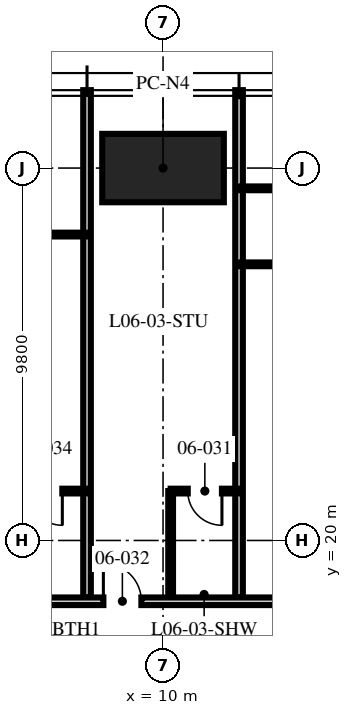
"""IFC4 building model, lengths in metres.
Left out: names, types, materials, properties, quantities, classifications, styles, units other than length and angle.
Written with IfcOpenShell. Run it as: python <this file> out.ifc"""

import sys

from ifc_helpers import new_model, si_unit, direction, frame, frame_2d, origin, origin_2d, place, context, subcontext, project, spatial, rectangle, hollow_rectangle, extrude, element, fill, save


model = new_model("IFC4")
c1 = context("Model", 3, precision=1e-05, world=origin(), true_north=direction((0.0, 1.0)))
c2 = subcontext(c1, "Body", "Model", "MODEL_VIEW")
j1 = project(units=[si_unit("LENGTHUNIT", "METRE"), si_unit("PLANEANGLEUNIT", "RADIAN")], contexts=[c1])
p1 = place(None, origin())
s1 = spatial("IfcSite", under=j1, at=p1, CompositionType="ELEMENT")
p2 = place(p1, origin())
s2 = spatial("IfcBuilding", under=s1, at=p2, CompositionType="ELEMENT")
p3 = place(p2, frame((0.0, 0.0, 28.5)))
s3 = spatial("IfcBuildingStorey", under=s2, at=p3, CompositionType="ELEMENT", Elevation=28.5)
p4 = place(p3, frame((10.0, 29.8, 0.0), z_axis=(0.0, 0.0, 1.0), x_axis=(1.0, 0.0, 0.0)))
e1 = element("IfcColumn", 1, at=p4, inside=s3, PredefinedType="COLUMN", context=c2, shape_type="SweptSolid", body=[
    extrude(hollow_rectangle(XDim=3.2, YDim=1.8, WallThickness=0.2, at=origin_2d()), origin(), (0.0, 0.0, 1.0), 3.75),
])
for number, where, z_axis, x_axis in (
    (2, (12.0, 18.5, 0.0), (0.0, 0.0, 1.0), (0.0, 1.0, 0.0)),
    (3, (8.0, 18.5, 0.0), (0.0, 0.0, 1.0), (0.0, 1.0, 0.0)),
):
    element("IfcWall", number, at=place(p3, frame(where, z_axis=z_axis, x_axis=x_axis)), inside=s3, PredefinedType="PARTITIONING", context=c2, shape_type="SweptSolid", body=[
        extrude(rectangle(XDim=13.35, YDim=0.2, at=frame_2d((6.675, 0.0))), origin(), (0.0, 0.0, 1.0), 2.71),
    ])
p5 = place(p3, frame((18.0, 29.267, 0.0), z_axis=(0.0, 0.0, 1.0), x_axis=(-1.0, 0.0, 0.0)))
e4 = element("IfcWall", 4, at=p5, inside=s3, PredefinedType="PARTITIONING", context=c2, shape_type="SweptSolid", body=[
    extrude(rectangle(XDim=6.0, YDim=0.1, at=frame_2d((3.0, 0.0))), origin(), (0.0, 0.0, 1.0), 2.61),
])
p6 = place(p5, frame((0.15, 0.0, 0.0)))
e5 = element("IfcOpeningElement", 5, at=p6, cuts=e4, PredefinedType="OPENING", context=c2, shape_type="SweptSolid", body=[
    extrude(rectangle(XDim=0.9, YDim=2.1, at=frame_2d((0.45, 1.05))), frame((0.0, 0.06, 0.0), z_axis=(0.0, -1.0, 0.0), x_axis=(1.0, 0.0, 0.0)), (0.0, 0.0, 1.0), 0.12),
])
p7 = place(p5, frame((3.15, 0.0, 0.0)))
e6 = element("IfcOpeningElement", 6, at=p7, cuts=e4, PredefinedType="OPENING", context=c2, shape_type="SweptSolid", body=[
    extrude(rectangle(XDim=0.9, YDim=2.1, at=frame_2d((0.45, 1.05))), frame((0.0, 0.06, 0.0), z_axis=(0.0, -1.0, 0.0), x_axis=(1.0, 0.0, 0.0)), (0.0, 0.0, 1.0), 0.12),
])
p8 = place(p3, frame((16.8, 27.267, 0.0), z_axis=(0.0, 0.0, 1.0), x_axis=(-1.0, 0.0, 0.0)))
e7 = element("IfcWall", 7, at=p8, inside=s3, PredefinedType="PARTITIONING", context=c2, shape_type="SweptSolid", body=[
    extrude(rectangle(XDim=4.8, YDim=0.1, at=frame_2d((2.4, 0.0))), origin(), (0.0, 0.0, 1.0), 2.61),
])
p9 = place(p3, frame((12.0, 21.3, 0.0), z_axis=(0.0, 0.0, 1.0), x_axis=(-1.0, 0.0, 0.0)))
e8 = element("IfcWall", 8, at=p9, inside=s3, PredefinedType="PARTITIONING", context=c2, shape_type="SweptSolid", body=[
    extrude(rectangle(XDim=1.8, YDim=0.125, at=frame_2d((0.9, 0.0))), origin(), (0.0, 0.0, 1.0), 3.5),
])
p10 = place(p9, frame((0.45, 0.0, 0.0)))
e9 = element("IfcOpeningElement", 9, at=p10, cuts=e8, PredefinedType="OPENING", context=c2, shape_type="SweptSolid", body=[
    extrude(rectangle(XDim=0.9, YDim=2.1, at=frame_2d((0.45, 1.05))), frame((0.0, 0.073, 0.0), z_axis=(0.0, -1.0, 0.0), x_axis=(1.0, 0.0, 0.0)), (0.0, 0.0, 1.0), 0.145),
])
p11 = place(p3, frame((10.2, 18.5, 0.0), z_axis=(0.0, 0.0, 1.0), x_axis=(0.0, 1.0, 0.0)))
e10 = element("IfcWall", 10, at=p11, inside=s3, PredefinedType="PARTITIONING", context=c2, shape_type="SweptSolid", body=[
    extrude(rectangle(XDim=2.8, YDim=0.125, at=frame_2d((1.4, 0.0))), origin(), (0.0, 0.0, 1.0), 2.492),
])
p12 = place(p3, frame((8.0, 28.05, 0.0), z_axis=(0.0, 0.0, 1.0), x_axis=(-1.0, 0.0, 0.0)))
e11 = element("IfcWall", 11, at=p12, inside=s3, PredefinedType="PARTITIONING", context=c2, shape_type="SweptSolid", body=[
    extrude(rectangle(XDim=6.0, YDim=0.1, at=frame_2d((3.0, 0.0))), origin(), (0.0, 0.0, 1.0), 2.61),
])
p13 = place(p12, frame((2.55, 0.0, 0.0)))
e12 = element("IfcOpeningElement", 12, at=p13, cuts=e11, PredefinedType="OPENING", context=c2, shape_type="SweptSolid", body=[
    extrude(rectangle(XDim=0.9, YDim=2.1, at=frame_2d((0.45, 1.05))), frame((0.0, 0.06, 0.0), z_axis=(0.0, -1.0, 0.0), x_axis=(1.0, 0.0, 0.0)), (0.0, 0.0, 1.0), 0.12),
])
p14 = place(p3, frame((8.0, 21.3, 0.0), z_axis=(0.0, 0.0, 1.0), x_axis=(-1.0, 0.0, 0.0)))
e13 = element("IfcWall", 13, at=p14, inside=s3, PredefinedType="PARTITIONING", context=c2, shape_type="SweptSolid", body=[
    extrude(rectangle(XDim=2.2, YDim=0.125, at=frame_2d((1.1, 0.0))), origin(), (0.0, 0.0, 1.0), 3.5),
])
p15 = place(p14, frame((0.65, 0.0, 0.0)))
e14 = element("IfcOpeningElement", 14, at=p15, cuts=e13, PredefinedType="OPENING", context=c2, shape_type="SweptSolid", body=[
    extrude(rectangle(XDim=0.9, YDim=2.1, at=frame_2d((0.45, 1.05))), frame((0.0, 0.073, 0.0), z_axis=(0.0, -1.0, 0.0), x_axis=(1.0, 0.0, 0.0)), (0.0, 0.0, 1.0), 0.145),
])
p16 = place(p3, frame((0.0, 18.4, 0.0), z_axis=(0.0, 0.0, 1.0), x_axis=(1.0, 0.0, 0.0)))
e15 = element("IfcWall", 15, at=p16, inside=s3, PredefinedType="PARTITIONING", context=c2, shape_type="SweptSolid", body=[
    extrude(rectangle(XDim=18.5, YDim=0.2, at=frame_2d((9.25, 0.0))), origin(), (0.0, 0.0, 1.0), 2.3),
])
p17 = place(p16, frame((8.43, 0.0, 0.0)))
e16 = element("IfcOpeningElement", 16, at=p17, cuts=e15, PredefinedType="OPENING", context=c2, shape_type="SweptSolid", body=[
    extrude(rectangle(XDim=1.0, YDim=2.2, at=frame_2d((0.5, 1.1))), frame((0.0, 0.11, 0.0), z_axis=(0.0, -1.0, 0.0), x_axis=(1.0, 0.0, 0.0)), (0.0, 0.0, 1.0), 0.22),
])
p18 = place(p10, origin())
e17 = element("IfcDoor", 17, at=p18, inside=s3, OperationType="SINGLE_SWING_LEFT", PredefinedType="DOOR", context=c2, shape_type="SweptSolid", body=[
    extrude(rectangle(XDim=0.9, YDim=2.1, at=frame_2d((0.45, 1.05))), frame((0.0, 0.025, 0.0), z_axis=(0.0, -1.0, 0.0), x_axis=(1.0, 0.0, 0.0)), (0.0, 0.0, 1.0), 0.05),
])
fill(e9, e17)
p19 = place(p17, origin())
e18 = element("IfcDoor", 18, at=p19, inside=s3, OperationType="SINGLE_SWING_LEFT", PredefinedType="DOOR", context=c2, shape_type="SweptSolid", body=[
    extrude(rectangle(XDim=1.0, YDim=2.2, at=frame_2d((0.5, 1.1))), frame((0.0, 0.025, 0.0), z_axis=(0.0, -1.0, 0.0), x_axis=(1.0, 0.0, 0.0)), (0.0, 0.0, 1.0), 0.05),
])
fill(e16, e18)
p20 = place(p15, origin())
e19 = element("IfcDoor", 19, at=p20, inside=s3, OperationType="SINGLE_SWING_LEFT", PredefinedType="DOOR", context=c2, shape_type="SweptSolid", body=[
    extrude(rectangle(XDim=0.9, YDim=2.1, at=frame_2d((0.45, 1.05))), frame((0.0, 0.025, 0.0), z_axis=(0.0, -1.0, 0.0), x_axis=(1.0, 0.0, 0.0)), (0.0, 0.0, 1.0), 0.05),
])
fill(e14, e19)
save(model, sys.argv[1])
